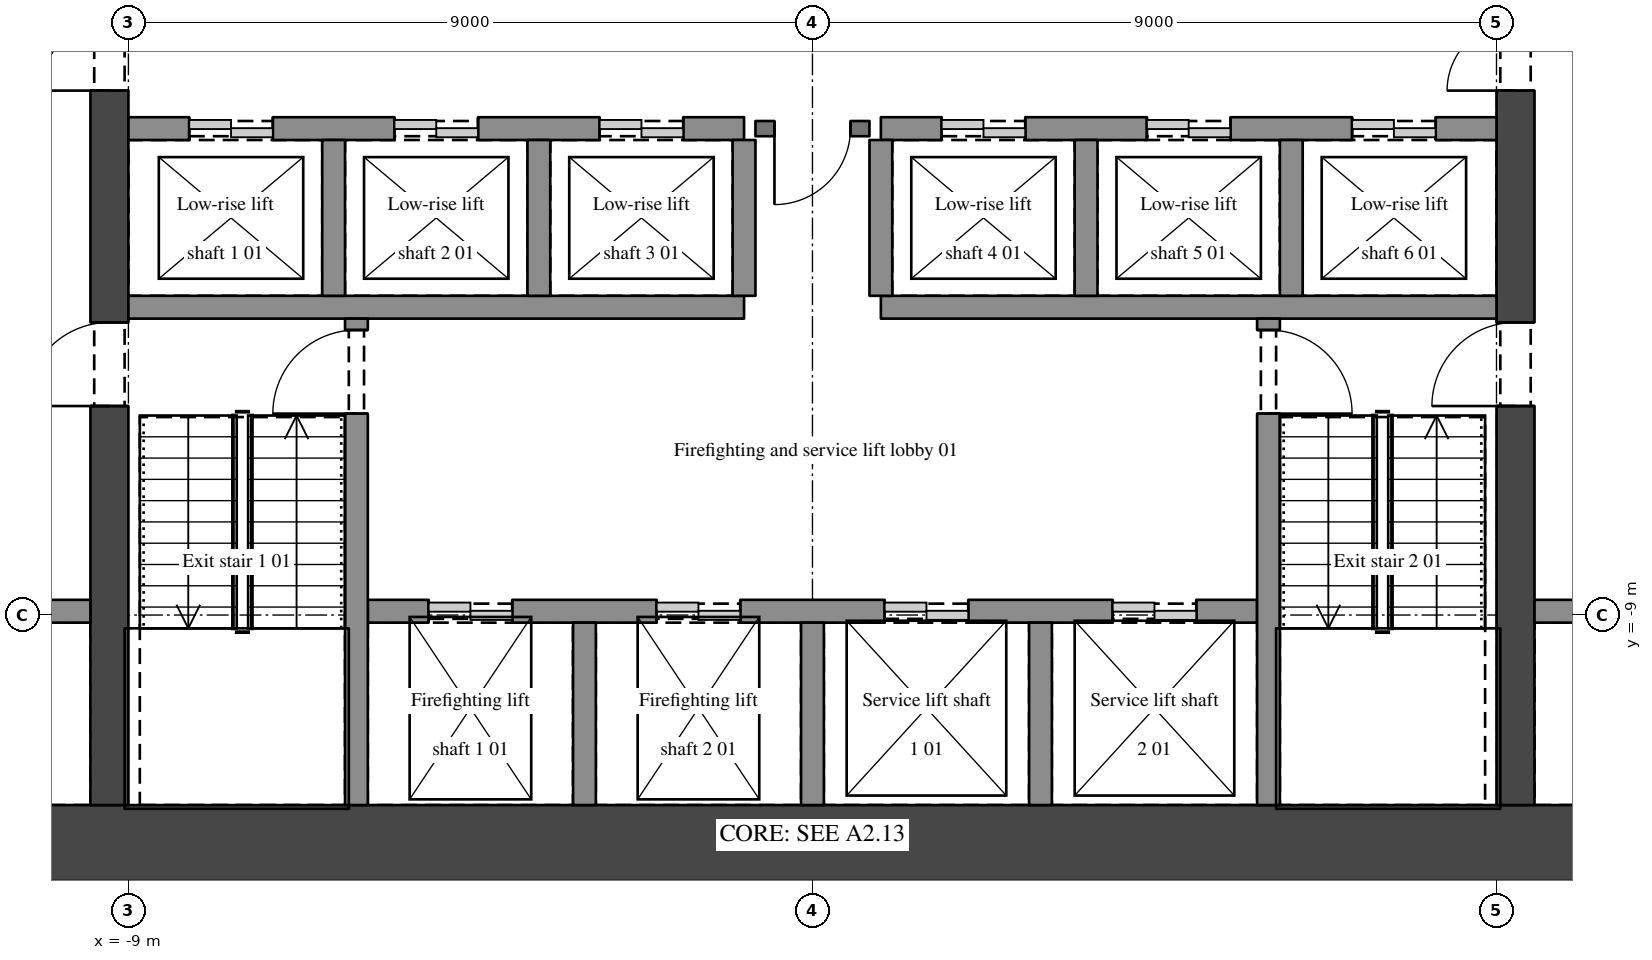
"""IFC4 building model, lengths in metres.
Left out: names, types, materials, properties, quantities, classifications, styles, units other than length and angle.
Written with IfcOpenShell. Run it as: python <this file> out.ifc"""

import sys

from ifc_helpers import new_model, si_unit, direction, frame, frame_2d, origin, place, context, subcontext, project, spatial, rectangle, extrude, element, fill, save


model = new_model("IFC4")
c1 = context("Model", 3, precision=1e-05, world=origin(), true_north=direction((0.0, 1.0)))
c2 = subcontext(c1, "Body", "Model", "MODEL_VIEW")
j1 = project(units=[si_unit("LENGTHUNIT", "METRE"), si_unit("PLANEANGLEUNIT", "RADIAN")], contexts=[c1])
p1 = place(None, origin())
s1 = spatial("IfcSite", under=j1, at=p1, CompositionType="ELEMENT")
p2 = place(p1, origin())
s2 = spatial("IfcBuilding", under=s1, at=p2, CompositionType="ELEMENT")
p3 = place(p2, frame((0.0, 0.0, 105.0)))
s3 = spatial("IfcBuildingStorey", under=s2, at=p3, CompositionType="ELEMENT", Elevation=105.0)
p4 = place(p3, frame((-15.0, -12.0, 0.0), z_axis=(0.0, 0.0, 1.0), x_axis=(1.0, 0.0, 0.0)))
e1 = element("IfcWall", 1, at=p4, inside=s3, PredefinedType="SHEAR", context=c2, shape_type="SweptSolid", body=[
    extrude(rectangle(XDim=30.0, YDim=1.0, at=frame_2d((15.0, 0.0))), origin(), (0.0, 0.0, 1.0), 3.9),
])
p5 = place(p3, frame((-9.25, -11.5, 0.0), z_axis=(0.0, 0.0, 1.0), x_axis=(0.0, 1.0, 0.0)))
e2 = element("IfcWall", 2, at=p5, inside=s3, PredefinedType="SHEAR", context=c2, shape_type="SweptSolid", body=[
    extrude(rectangle(XDim=11.65, YDim=0.5, at=frame_2d((5.825, 0.0))), origin(), (0.0, 0.0, 1.0), 3.9),
])
p6 = place(p5, frame((9.4, 0.0, 0.0)))
e3 = element("IfcOpeningElement", 3, at=p6, cuts=e2, PredefinedType="OPENING", context=c2, shape_type="SweptSolid", body=[
    extrude(rectangle(XDim=1.8, YDim=2.1, at=frame_2d((0.9, 1.05))), frame((0.0, 0.26, 0.0), z_axis=(0.0, -1.0, 0.0), x_axis=(1.0, 0.0, 0.0)), (0.0, 0.0, 1.0), 0.52),
])
p7 = place(p5, frame((5.25, 0.0, 0.0)))
e4 = element("IfcOpeningElement", 4, at=p7, cuts=e2, PredefinedType="OPENING", context=c2, shape_type="SweptSolid", body=[
    extrude(rectangle(XDim=1.1, YDim=2.1, at=frame_2d((0.55, 1.05))), frame((0.0, 0.26, 0.0), z_axis=(0.0, -1.0, 0.0), x_axis=(1.0, 0.0, 0.0)), (0.0, 0.0, 1.0), 0.52),
])
p8 = place(p3, frame((9.25, -11.5, 0.0), z_axis=(0.0, 0.0, 1.0), x_axis=(0.0, 1.0, 0.0)))
e5 = element("IfcWall", 5, at=p8, inside=s3, PredefinedType="SHEAR", context=c2, shape_type="SweptSolid", body=[
    extrude(rectangle(XDim=11.65, YDim=0.5, at=frame_2d((5.825, 0.0))), origin(), (0.0, 0.0, 1.0), 3.9),
])
p9 = place(p8, frame((9.4, 0.0, 0.0)))
e6 = element("IfcOpeningElement", 6, at=p9, cuts=e5, PredefinedType="OPENING", context=c2, shape_type="SweptSolid", body=[
    extrude(rectangle(XDim=1.8, YDim=2.1, at=frame_2d((0.9, 1.05))), frame((0.0, 0.26, 0.0), z_axis=(0.0, -1.0, 0.0), x_axis=(1.0, 0.0, 0.0)), (0.0, 0.0, 1.0), 0.52),
])
p10 = place(p8, frame((5.25, 0.0, 0.0)))
e7 = element("IfcOpeningElement", 7, at=p10, cuts=e5, PredefinedType="OPENING", context=c2, shape_type="SweptSolid", body=[
    extrude(rectangle(XDim=1.1, YDim=2.1, at=frame_2d((0.55, 1.05))), frame((0.0, 0.26, 0.0), z_axis=(0.0, -1.0, 0.0), x_axis=(1.0, 0.0, 0.0)), (0.0, 0.0, 1.0), 0.52),
])
p11 = place(p3, frame((-12.25, -8.95, 0.0), z_axis=(0.0, 0.0, 1.0), x_axis=(1.0, 0.0, 0.0)))
e8 = element("IfcWall", 8, at=p11, inside=s3, PredefinedType="SHEAR", context=c2, shape_type="SweptSolid", body=[
    extrude(rectangle(XDim=2.75, YDim=0.3, at=frame_2d((1.375, 0.0))), origin(), (0.0, 0.0, 1.0), 3.9),
])
p12 = place(p3, frame((-5.85, -8.95, 0.0), z_axis=(0.0, 0.0, 1.0), x_axis=(1.0, 0.0, 0.0)))
e9 = element("IfcWall", 9, at=p12, inside=s3, PredefinedType="SHEAR", context=c2, shape_type="SweptSolid", body=[
    extrude(rectangle(XDim=11.7, YDim=0.3, at=frame_2d((5.85, 0.0))), origin(), (0.0, 0.0, 1.0), 3.9),
])
p13 = place(p12, frame((0.8, 0.0, 0.0)))
e10 = element("IfcOpeningElement", 10, at=p13, cuts=e9, PredefinedType="OPENING", context=c2, shape_type="SweptSolid", body=[
    extrude(rectangle(XDim=1.1, YDim=2.1, at=frame_2d((0.55, 1.05))), frame((0.0, 0.16, 0.0), z_axis=(0.0, -1.0, 0.0), x_axis=(1.0, 0.0, 0.0)), (0.0, 0.0, 1.0), 0.32),
])
p14 = place(p12, frame((3.8, 0.0, 0.0)))
e11 = element("IfcOpeningElement", 11, at=p14, cuts=e9, PredefinedType="OPENING", context=c2, shape_type="SweptSolid", body=[
    extrude(rectangle(XDim=1.1, YDim=2.1, at=frame_2d((0.55, 1.05))), frame((0.0, 0.16, 0.0), z_axis=(0.0, -1.0, 0.0), x_axis=(1.0, 0.0, 0.0)), (0.0, 0.0, 1.0), 0.32),
])
p15 = place(p12, frame((6.8, 0.0, 0.0)))
e12 = element("IfcOpeningElement", 12, at=p15, cuts=e9, PredefinedType="OPENING", context=c2, shape_type="SweptSolid", body=[
    extrude(rectangle(XDim=1.1, YDim=2.1, at=frame_2d((0.55, 1.05))), frame((0.0, 0.16, 0.0), z_axis=(0.0, -1.0, 0.0), x_axis=(1.0, 0.0, 0.0)), (0.0, 0.0, 1.0), 0.32),
])
p16 = place(p12, frame((9.8, 0.0, 0.0)))
e13 = element("IfcOpeningElement", 13, at=p16, cuts=e9, PredefinedType="OPENING", context=c2, shape_type="SweptSolid", body=[
    extrude(rectangle(XDim=1.1, YDim=2.1, at=frame_2d((0.55, 1.05))), frame((0.0, 0.16, 0.0), z_axis=(0.0, -1.0, 0.0), x_axis=(1.0, 0.0, 0.0)), (0.0, 0.0, 1.0), 0.32),
])
p17 = place(p3, frame((9.5, -8.95, 0.0), z_axis=(0.0, 0.0, 1.0), x_axis=(1.0, 0.0, 0.0)))
e14 = element("IfcWall", 14, at=p17, inside=s3, PredefinedType="SHEAR", context=c2, shape_type="SweptSolid", body=[
    extrude(rectangle(XDim=2.75, YDim=0.3, at=frame_2d((1.375, 0.0))), origin(), (0.0, 0.0, 1.0), 3.9),
])
for number, where, z_axis, x_axis in (
    (15, (-9.0, -4.95, 0.0), (0.0, 0.0, 1.0), (1.0, 0.0, 0.0)),
    (16, (0.9, -4.95, 0.0), (0.0, 0.0, 1.0), (1.0, 0.0, 0.0)),
):
    element("IfcWall", number, at=place(p3, frame(where, z_axis=z_axis, x_axis=x_axis)), inside=s3, PredefinedType="SHEAR", context=c2, shape_type="SweptSolid", body=[
        extrude(rectangle(XDim=8.1, YDim=0.3, at=frame_2d((4.05, 0.0))), origin(), (0.0, 0.0, 1.0), 3.9),
    ])
p18 = place(p3, frame((-9.0, -2.6, 0.0), z_axis=(0.0, 0.0, 1.0), x_axis=(1.0, 0.0, 0.0)))
e17 = element("IfcWall", 17, at=p18, inside=s3, PredefinedType="SHEAR", context=c2, shape_type="SweptSolid", body=[
    extrude(rectangle(XDim=8.1, YDim=0.3, at=frame_2d((4.05, 0.0))), origin(), (0.0, 0.0, 1.0), 3.9),
])
p19 = place(p18, frame((0.8, 0.0, 0.0)))
e18 = element("IfcOpeningElement", 18, at=p19, cuts=e17, PredefinedType="OPENING", context=c2, shape_type="SweptSolid", body=[
    extrude(rectangle(XDim=1.1, YDim=2.1, at=frame_2d((0.55, 1.05))), frame((0.0, 0.16, 0.0), z_axis=(0.0, -1.0, 0.0), x_axis=(1.0, 0.0, 0.0)), (0.0, 0.0, 1.0), 0.32),
])
p20 = place(p18, frame((3.5, 0.0, 0.0)))
e19 = element("IfcOpeningElement", 19, at=p20, cuts=e17, PredefinedType="OPENING", context=c2, shape_type="SweptSolid", body=[
    extrude(rectangle(XDim=1.1, YDim=2.1, at=frame_2d((0.55, 1.05))), frame((0.0, 0.16, 0.0), z_axis=(0.0, -1.0, 0.0), x_axis=(1.0, 0.0, 0.0)), (0.0, 0.0, 1.0), 0.32),
])
p21 = place(p18, frame((6.2, 0.0, 0.0)))
e20 = element("IfcOpeningElement", 20, at=p21, cuts=e17, PredefinedType="OPENING", context=c2, shape_type="SweptSolid", body=[
    extrude(rectangle(XDim=1.1, YDim=2.1, at=frame_2d((0.55, 1.05))), frame((0.0, 0.16, 0.0), z_axis=(0.0, -1.0, 0.0), x_axis=(1.0, 0.0, 0.0)), (0.0, 0.0, 1.0), 0.32),
])
p22 = place(p3, frame((0.75, -2.6, 0.0), z_axis=(0.0, 0.0, 1.0), x_axis=(-1.0, 0.0, 0.0)))
e21 = element("IfcWall", 21, at=p22, inside=s3, PredefinedType="SOLIDWALL", context=c2, shape_type="SweptSolid", body=[
    extrude(rectangle(XDim=1.5, YDim=0.2, at=frame_2d((0.75, 0.0))), origin(), (0.0, 0.0, 1.0), 3.6),
])
p23 = place(p22, frame((0.25, 0.0, 0.0)))
e22 = element("IfcOpeningElement", 22, at=p23, cuts=e21, PredefinedType="OPENING", context=c2, shape_type="SweptSolid", body=[
    extrude(rectangle(XDim=1.0, YDim=2.1, at=frame_2d((0.5, 1.05))), frame((0.0, 0.11, 0.0), z_axis=(0.0, -1.0, 0.0), x_axis=(1.0, 0.0, 0.0)), (0.0, 0.0, 1.0), 0.22),
])
p24 = place(p3, frame((0.9, -2.6, 0.0), z_axis=(0.0, 0.0, 1.0), x_axis=(1.0, 0.0, 0.0)))
e23 = element("IfcWall", 23, at=p24, inside=s3, PredefinedType="SHEAR", context=c2, shape_type="SweptSolid", body=[
    extrude(rectangle(XDim=8.1, YDim=0.3, at=frame_2d((4.05, 0.0))), origin(), (0.0, 0.0, 1.0), 3.9),
])
p25 = place(p24, frame((0.8, 0.0, 0.0)))
e24 = element("IfcOpeningElement", 24, at=p25, cuts=e23, PredefinedType="OPENING", context=c2, shape_type="SweptSolid", body=[
    extrude(rectangle(XDim=1.1, YDim=2.1, at=frame_2d((0.55, 1.05))), frame((0.0, 0.16, 0.0), z_axis=(0.0, -1.0, 0.0), x_axis=(1.0, 0.0, 0.0)), (0.0, 0.0, 1.0), 0.32),
])
p26 = place(p24, frame((3.5, 0.0, 0.0)))
e25 = element("IfcOpeningElement", 25, at=p26, cuts=e23, PredefinedType="OPENING", context=c2, shape_type="SweptSolid", body=[
    extrude(rectangle(XDim=1.1, YDim=2.1, at=frame_2d((0.55, 1.05))), frame((0.0, 0.16, 0.0), z_axis=(0.0, -1.0, 0.0), x_axis=(1.0, 0.0, 0.0)), (0.0, 0.0, 1.0), 0.32),
])
p27 = place(p24, frame((6.2, 0.0, 0.0)))
e26 = element("IfcOpeningElement", 26, at=p27, cuts=e23, PredefinedType="OPENING", context=c2, shape_type="SweptSolid", body=[
    extrude(rectangle(XDim=1.1, YDim=2.1, at=frame_2d((0.55, 1.05))), frame((0.0, 0.16, 0.0), z_axis=(0.0, -1.0, 0.0), x_axis=(1.0, 0.0, 0.0)), (0.0, 0.0, 1.0), 0.32),
])
p28 = place(p3, frame((-6.3, -4.8, 0.0), z_axis=(0.0, 0.0, 1.0), x_axis=(0.0, 1.0, 0.0)))
e27 = element("IfcWall", 27, at=p28, inside=s3, PredefinedType="SHEAR", context=c2, shape_type="SweptSolid", body=[
    extrude(rectangle(XDim=2.05, YDim=0.3, at=frame_2d((1.025, 0.0))), origin(), (0.0, 0.0, 1.0), 3.9),
])
p29 = place(p3, frame((-6.0, -11.5, 0.0), z_axis=(0.0, 0.0, 1.0), x_axis=(0.0, 1.0, 0.0)))
e28 = element("IfcWall", 28, at=p29, inside=s3, PredefinedType="SHEAR", context=c2, shape_type="SweptSolid", body=[
    extrude(rectangle(XDim=6.4, YDim=0.3, at=frame_2d((3.2, 0.0))), origin(), (0.0, 0.0, 1.0), 3.9),
])
p30 = place(p29, frame((5.15, 0.0, 0.0)))
e29 = element("IfcOpeningElement", 29, at=p30, cuts=e28, PredefinedType="OPENING", context=c2, shape_type="SweptSolid", body=[
    extrude(rectangle(XDim=1.1, YDim=2.1, at=frame_2d((0.55, 1.05))), frame((0.0, 0.16, 0.0), z_axis=(0.0, -1.0, 0.0), x_axis=(1.0, 0.0, 0.0)), (0.0, 0.0, 1.0), 0.32),
])
p31 = place(p3, frame((-3.6, -4.8, 0.0), z_axis=(0.0, 0.0, 1.0), x_axis=(0.0, 1.0, 0.0)))
e30 = element("IfcWall", 30, at=p31, inside=s3, PredefinedType="SHEAR", context=c2, shape_type="SweptSolid", body=[
    extrude(rectangle(XDim=2.05, YDim=0.3, at=frame_2d((1.025, 0.0))), origin(), (0.0, 0.0, 1.0), 3.9),
])
p32 = place(p3, frame((-3.0, -11.5, 0.0), z_axis=(0.0, 0.0, 1.0), x_axis=(0.0, 1.0, 0.0)))
e31 = element("IfcWall", 31, at=p32, inside=s3, PredefinedType="SHEAR", context=c2, shape_type="SweptSolid", body=[
    extrude(rectangle(XDim=2.4, YDim=0.3, at=frame_2d((1.2, 0.0))), origin(), (0.0, 0.0, 1.0), 3.9),
])
p33 = place(p3, frame((-0.9, -4.8, 0.0), z_axis=(0.0, 0.0, 1.0), x_axis=(0.0, 1.0, 0.0)))
e32 = element("IfcWall", 32, at=p33, inside=s3, PredefinedType="SHEAR", context=c2, shape_type="SweptSolid", body=[
    extrude(rectangle(XDim=2.05, YDim=0.3, at=frame_2d((1.025, 0.0))), origin(), (0.0, 0.0, 1.0), 3.9),
])
p34 = place(p3, frame((0.0, -11.5, 0.0), z_axis=(0.0, 0.0, 1.0), x_axis=(0.0, 1.0, 0.0)))
e33 = element("IfcWall", 33, at=p34, inside=s3, PredefinedType="SHEAR", context=c2, shape_type="SweptSolid", body=[
    extrude(rectangle(XDim=2.4, YDim=0.3, at=frame_2d((1.2, 0.0))), origin(), (0.0, 0.0, 1.0), 3.9),
])
p35 = place(p3, frame((0.9, -4.8, 0.0), z_axis=(0.0, 0.0, 1.0), x_axis=(0.0, 1.0, 0.0)))
e34 = element("IfcWall", 34, at=p35, inside=s3, PredefinedType="SHEAR", context=c2, shape_type="SweptSolid", body=[
    extrude(rectangle(XDim=2.05, YDim=0.3, at=frame_2d((1.025, 0.0))), origin(), (0.0, 0.0, 1.0), 3.9),
])
p36 = place(p3, frame((3.0, -11.5, 0.0), z_axis=(0.0, 0.0, 1.0), x_axis=(0.0, 1.0, 0.0)))
e35 = element("IfcWall", 35, at=p36, inside=s3, PredefinedType="SHEAR", context=c2, shape_type="SweptSolid", body=[
    extrude(rectangle(XDim=2.4, YDim=0.3, at=frame_2d((1.2, 0.0))), origin(), (0.0, 0.0, 1.0), 3.9),
])
p37 = place(p3, frame((3.6, -4.8, 0.0), z_axis=(0.0, 0.0, 1.0), x_axis=(0.0, 1.0, 0.0)))
e36 = element("IfcWall", 36, at=p37, inside=s3, PredefinedType="SHEAR", context=c2, shape_type="SweptSolid", body=[
    extrude(rectangle(XDim=2.05, YDim=0.3, at=frame_2d((1.025, 0.0))), origin(), (0.0, 0.0, 1.0), 3.9),
])
p38 = place(p3, frame((6.0, -5.1, 0.0), z_axis=(0.0, 0.0, 1.0), x_axis=(0.0, -1.0, 0.0)))
e37 = element("IfcWall", 37, at=p38, inside=s3, PredefinedType="SHEAR", context=c2, shape_type="SweptSolid", body=[
    extrude(rectangle(XDim=6.4, YDim=0.3, at=frame_2d((3.2, 0.0))), origin(), (0.0, 0.0, 1.0), 3.9),
])
p39 = place(p38, frame((0.15, 0.0, 0.0)))
e38 = element("IfcOpeningElement", 38, at=p39, cuts=e37, PredefinedType="OPENING", context=c2, shape_type="SweptSolid", body=[
    extrude(rectangle(XDim=1.1, YDim=2.1, at=frame_2d((0.55, 1.05))), frame((0.0, 0.16, 0.0), z_axis=(0.0, -1.0, 0.0), x_axis=(1.0, 0.0, 0.0)), (0.0, 0.0, 1.0), 0.32),
])
p40 = place(p3, frame((6.3, -4.8, 0.0), z_axis=(0.0, 0.0, 1.0), x_axis=(0.0, 1.0, 0.0)))
e39 = element("IfcWall", 39, at=p40, inside=s3, PredefinedType="SHEAR", context=c2, shape_type="SweptSolid", body=[
    extrude(rectangle(XDim=2.05, YDim=0.3, at=frame_2d((1.025, 0.0))), origin(), (0.0, 0.0, 1.0), 3.9),
])
p41 = place(p9, origin())
e40 = element("IfcDoor", 40, at=p41, inside=s3, OperationType="DOUBLE_DOOR_SINGLE_SWING", PredefinedType="DOOR", context=c2, shape_type="SweptSolid", body=[
    extrude(rectangle(XDim=1.8, YDim=2.1, at=frame_2d((0.9, 1.05))), frame((0.0, 0.025, 0.0), z_axis=(0.0, -1.0, 0.0), x_axis=(1.0, 0.0, 0.0)), (0.0, 0.0, 1.0), 0.05),
])
fill(e6, e40)
p42 = place(p6, origin())
e41 = element("IfcDoor", 41, at=p42, inside=s3, OperationType="DOUBLE_DOOR_SINGLE_SWING", PredefinedType="DOOR", context=c2, shape_type="SweptSolid", body=[
    extrude(rectangle(XDim=1.8, YDim=2.1, at=frame_2d((0.9, 1.05))), frame((0.0, 0.025, 0.0), z_axis=(0.0, -1.0, 0.0), x_axis=(1.0, 0.0, 0.0)), (0.0, 0.0, 1.0), 0.05),
])
fill(e3, e41)
p43 = place(p23, origin())
e42 = element("IfcDoor", 42, at=p43, inside=s3, OperationType="SINGLE_SWING_RIGHT", PredefinedType="DOOR", context=c2, shape_type="SweptSolid", body=[
    extrude(rectangle(XDim=1.0, YDim=2.1, at=frame_2d((0.5, 1.05))), frame((0.0, 0.025, 0.0), z_axis=(0.0, -1.0, 0.0), x_axis=(1.0, 0.0, 0.0)), (0.0, 0.0, 1.0), 0.05),
])
fill(e22, e42)
p44 = place(p30, origin())
e43 = element("IfcDoor", 43, at=p44, inside=s3, OperationType="SINGLE_SWING_LEFT", PredefinedType="DOOR", context=c2, shape_type="SweptSolid", body=[
    extrude(rectangle(XDim=1.1, YDim=2.1, at=frame_2d((0.55, 1.05))), frame((0.0, 0.025, 0.0), z_axis=(0.0, -1.0, 0.0), x_axis=(1.0, 0.0, 0.0)), (0.0, 0.0, 1.0), 0.05),
])
fill(e29, e43)
p45 = place(p7, origin())
e44 = element("IfcDoor", 44, at=p45, inside=s3, OperationType="SINGLE_SWING_LEFT", PredefinedType="DOOR", context=c2, shape_type="SweptSolid", body=[
    extrude(rectangle(XDim=1.1, YDim=2.1, at=frame_2d((0.55, 1.05))), frame((0.0, 0.025, 0.0), z_axis=(0.0, -1.0, 0.0), x_axis=(1.0, 0.0, 0.0)), (0.0, 0.0, 1.0), 0.05),
])
fill(e4, e44)
p46 = place(p39, origin())
e45 = element("IfcDoor", 45, at=p46, inside=s3, OperationType="SINGLE_SWING_RIGHT", PredefinedType="DOOR", context=c2, shape_type="SweptSolid", body=[
    extrude(rectangle(XDim=1.1, YDim=2.1, at=frame_2d((0.55, 1.05))), frame((0.0, 0.025, 0.0), z_axis=(0.0, -1.0, 0.0), x_axis=(1.0, 0.0, 0.0)), (0.0, 0.0, 1.0), 0.05),
])
fill(e38, e45)
p47 = place(p10, origin())
e46 = element("IfcDoor", 46, at=p47, inside=s3, OperationType="SINGLE_SWING_LEFT", PredefinedType="DOOR", context=c2, shape_type="SweptSolid", body=[
    extrude(rectangle(XDim=1.1, YDim=2.1, at=frame_2d((0.55, 1.05))), frame((0.0, 0.025, 0.0), z_axis=(0.0, -1.0, 0.0), x_axis=(1.0, 0.0, 0.0)), (0.0, 0.0, 1.0), 0.05),
])
fill(e7, e46)
p48 = place(p13, origin())
e47 = element("IfcDoor", 47, at=p48, inside=s3, OperationType="DOUBLE_DOOR_SLIDING", PredefinedType="DOOR", context=c2, shape_type="SweptSolid", body=[
    extrude(rectangle(XDim=1.1, YDim=2.1, at=frame_2d((0.55, 1.05))), frame((0.0, 0.025, 0.0), z_axis=(0.0, -1.0, 0.0), x_axis=(1.0, 0.0, 0.0)), (0.0, 0.0, 1.0), 0.05),
])
fill(e10, e47)
p49 = place(p14, origin())
e48 = element("IfcDoor", 48, at=p49, inside=s3, OperationType="DOUBLE_DOOR_SLIDING", PredefinedType="DOOR", context=c2, shape_type="SweptSolid", body=[
    extrude(rectangle(XDim=1.1, YDim=2.1, at=frame_2d((0.55, 1.05))), frame((0.0, 0.025, 0.0), z_axis=(0.0, -1.0, 0.0), x_axis=(1.0, 0.0, 0.0)), (0.0, 0.0, 1.0), 0.05),
])
fill(e11, e48)
p50 = place(p19, origin())
e49 = element("IfcDoor", 49, at=p50, inside=s3, OperationType="DOUBLE_DOOR_SLIDING", PredefinedType="DOOR", context=c2, shape_type="SweptSolid", body=[
    extrude(rectangle(XDim=1.1, YDim=2.1, at=frame_2d((0.55, 1.05))), frame((0.0, 0.025, 0.0), z_axis=(0.0, -1.0, 0.0), x_axis=(1.0, 0.0, 0.0)), (0.0, 0.0, 1.0), 0.05),
])
fill(e18, e49)
p51 = place(p20, origin())
e50 = element("IfcDoor", 50, at=p51, inside=s3, OperationType="DOUBLE_DOOR_SLIDING", PredefinedType="DOOR", context=c2, shape_type="SweptSolid", body=[
    extrude(rectangle(XDim=1.1, YDim=2.1, at=frame_2d((0.55, 1.05))), frame((0.0, 0.025, 0.0), z_axis=(0.0, -1.0, 0.0), x_axis=(1.0, 0.0, 0.0)), (0.0, 0.0, 1.0), 0.05),
])
fill(e19, e50)
p52 = place(p21, origin())
e51 = element("IfcDoor", 51, at=p52, inside=s3, OperationType="DOUBLE_DOOR_SLIDING", PredefinedType="DOOR", context=c2, shape_type="SweptSolid", body=[
    extrude(rectangle(XDim=1.1, YDim=2.1, at=frame_2d((0.55, 1.05))), frame((0.0, 0.025, 0.0), z_axis=(0.0, -1.0, 0.0), x_axis=(1.0, 0.0, 0.0)), (0.0, 0.0, 1.0), 0.05),
])
fill(e20, e51)
p53 = place(p25, origin())
e52 = element("IfcDoor", 52, at=p53, inside=s3, OperationType="DOUBLE_DOOR_SLIDING", PredefinedType="DOOR", context=c2, shape_type="SweptSolid", body=[
    extrude(rectangle(XDim=1.1, YDim=2.1, at=frame_2d((0.55, 1.05))), frame((0.0, 0.025, 0.0), z_axis=(0.0, -1.0, 0.0), x_axis=(1.0, 0.0, 0.0)), (0.0, 0.0, 1.0), 0.05),
])
fill(e24, e52)
p54 = place(p26, origin())
e53 = element("IfcDoor", 53, at=p54, inside=s3, OperationType="DOUBLE_DOOR_SLIDING", PredefinedType="DOOR", context=c2, shape_type="SweptSolid", body=[
    extrude(rectangle(XDim=1.1, YDim=2.1, at=frame_2d((0.55, 1.05))), frame((0.0, 0.025, 0.0), z_axis=(0.0, -1.0, 0.0), x_axis=(1.0, 0.0, 0.0)), (0.0, 0.0, 1.0), 0.05),
])
fill(e25, e53)
p55 = place(p27, origin())
e54 = element("IfcDoor", 54, at=p55, inside=s3, OperationType="DOUBLE_DOOR_SLIDING", PredefinedType="DOOR", context=c2, shape_type="SweptSolid", body=[
    extrude(rectangle(XDim=1.1, YDim=2.1, at=frame_2d((0.55, 1.05))), frame((0.0, 0.025, 0.0), z_axis=(0.0, -1.0, 0.0), x_axis=(1.0, 0.0, 0.0)), (0.0, 0.0, 1.0), 0.05),
])
fill(e26, e54)
p56 = place(p15, origin())
e55 = element("IfcDoor", 55, at=p56, inside=s3, OperationType="DOUBLE_DOOR_SLIDING", PredefinedType="DOOR", context=c2, shape_type="SweptSolid", body=[
    extrude(rectangle(XDim=1.1, YDim=2.1, at=frame_2d((0.55, 1.05))), frame((0.0, 0.025, 0.0), z_axis=(0.0, -1.0, 0.0), x_axis=(1.0, 0.0, 0.0)), (0.0, 0.0, 1.0), 0.05),
])
fill(e12, e55)
p57 = place(p16, origin())
e56 = element("IfcDoor", 56, at=p57, inside=s3, OperationType="DOUBLE_DOOR_SLIDING", PredefinedType="DOOR", context=c2, shape_type="SweptSolid", body=[
    extrude(rectangle(XDim=1.1, YDim=2.1, at=frame_2d((0.55, 1.05))), frame((0.0, 0.025, 0.0), z_axis=(0.0, -1.0, 0.0), x_axis=(1.0, 0.0, 0.0)), (0.0, 0.0, 1.0), 0.05),
])
fill(e13, e56)
save(model, sys.argv[1])
